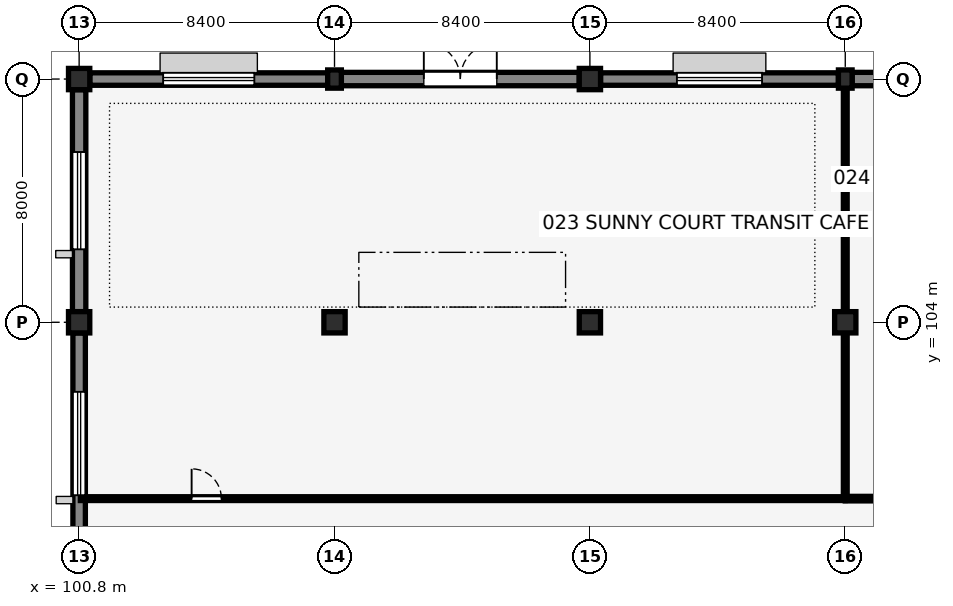
"""IFC4 building model, lengths in metres.
Left out: names, types, materials, properties, quantities, classifications, styles, units other than length and angle.
Written with IfcOpenShell. Run it as: python <this file> out.ifc"""

import sys

from ifc_helpers import new_model, si_unit, direction, frame, frame_2d, origin, origin_2d, place, context, subcontext, project, spatial, rectangle, extrude, element, fill, save


model = new_model("IFC4")
c1 = context("Model", 3, precision=1e-05, world=origin(), true_north=direction((0.0, 1.0)))
c2 = subcontext(c1, "Body", "Model", "MODEL_VIEW")
j1 = project(units=[si_unit("LENGTHUNIT", "METRE"), si_unit("PLANEANGLEUNIT", "RADIAN")], contexts=[c1])
p1 = place(None, origin())
s1 = spatial("IfcSite", under=j1, at=p1, CompositionType="ELEMENT")
p2 = place(p1, origin())
s2 = spatial("IfcBuilding", under=s1, at=p2, CompositionType="ELEMENT")
p3 = place(p2, origin())
s3 = spatial("IfcBuildingStorey", under=s2, at=p3, CompositionType="ELEMENT", Elevation=0.0)
for number, where, z_axis, x_axis in (
    (1, (100.8, 104.0, 0.0), (0.0, 0.0, 1.0), (1.0, 0.0, 0.0)),
    (2, (100.8, 112.0, 0.0), (0.0, 0.0, 1.0), (1.0, 0.0, 0.0)),
    (3, (109.2, 104.0, 0.0), (0.0, 0.0, 1.0), (1.0, 0.0, 0.0)),
):
    element("IfcColumn", number, at=place(p3, frame(where, z_axis=z_axis, x_axis=x_axis)), inside=s3, PredefinedType="COLUMN", context=c2, shape_type="SweptSolid", body=[
        extrude(rectangle(XDim=0.7, YDim=0.7, at=origin_2d()), origin(), (0.0, 0.0, 1.0), 5.15),
    ])
p4 = place(p3, frame((109.2, 112.0, 0.0), z_axis=(0.0, 0.0, 1.0), x_axis=(1.0, 0.0, 0.0)))
e4 = element("IfcColumn", 4, at=p4, inside=s3, PredefinedType="PILASTER", context=c2, shape_type="SweptSolid", body=[
    extrude(rectangle(XDim=0.45, YDim=0.6, at=origin_2d()), origin(), (0.0, 0.0, 1.0), 5.15),
])
for number, where, z_axis, x_axis in (
    (5, (117.6, 104.0, 0.0), (0.0, 0.0, 1.0), (1.0, 0.0, 0.0)),
    (6, (117.6, 112.0, 0.0), (0.0, 0.0, 1.0), (1.0, 0.0, 0.0)),
    (7, (126.0, 104.0, 0.0), (0.0, 0.0, 1.0), (1.0, 0.0, 0.0)),
):
    element("IfcColumn", number, at=place(p3, frame(where, z_axis=z_axis, x_axis=x_axis)), inside=s3, PredefinedType="COLUMN", context=c2, shape_type="SweptSolid", body=[
        extrude(rectangle(XDim=0.7, YDim=0.7, at=origin_2d()), origin(), (0.0, 0.0, 1.0), 5.15),
    ])
p5 = place(p3, frame((126.0, 112.0, 0.0), z_axis=(0.0, 0.0, 1.0), x_axis=(1.0, 0.0, 0.0)))
e8 = element("IfcColumn", 8, at=p5, inside=s3, PredefinedType="PILASTER", context=c2, shape_type="SweptSolid", body=[
    extrude(rectangle(XDim=0.45, YDim=0.6, at=origin_2d()), origin(), (0.0, 0.0, 1.0), 5.15),
])
p6 = place(p3, frame((100.8, 96.375, 0.0), z_axis=(0.0, 0.0, 1.0), x_axis=(0.0, 1.0, 0.0)))
e9 = element("IfcWall", 9, at=p6, inside=s3, PredefinedType="SOLIDWALL", context=c2, shape_type="SweptSolid", body=[
    extrude(rectangle(XDim=7.275, YDim=0.41, at=frame_2d((3.637, 0.0))), origin(), (0.0, 0.0, 1.0), 4.747),
])
p7 = place(p6, frame((1.938, 0.0, 0.9), z_axis=(0.0, 0.0, 1.0), x_axis=(1.0, 0.0, 0.0)))
e10 = element("IfcOpeningElement", 10, at=p7, cuts=e9, PredefinedType="OPENING", context=c2, shape_type="SweptSolid", body=[
    extrude(rectangle(XDim=3.4, YDim=1.7, at=frame_2d((1.7, 0.85))), frame((0.0, 0.215, 0.0), z_axis=(0.0, -1.0, 0.0), x_axis=(1.0, 0.0, 0.0)), (0.0, 0.0, 1.0), 0.43),
])
p8 = place(p3, frame((100.8, 104.35, 0.0), z_axis=(0.0, 0.0, 1.0), x_axis=(0.0, 1.0, 0.0)))
e11 = element("IfcWall", 11, at=p8, inside=s3, PredefinedType="SOLIDWALL", context=c2, shape_type="SweptSolid", body=[
    extrude(rectangle(XDim=7.3, YDim=0.44, at=frame_2d((3.65, 0.0))), origin(), (0.0, 0.0, 1.0), 4.747),
])
p9 = place(p8, frame((2.05, 0.0, 0.9), z_axis=(0.0, 0.0, 1.0), x_axis=(1.0, 0.0, 0.0)))
e12 = element("IfcOpeningElement", 12, at=p9, cuts=e11, PredefinedType="OPENING", context=c2, shape_type="SweptSolid", body=[
    extrude(rectangle(XDim=3.2, YDim=1.65, at=frame_2d((1.6, 0.825))), frame((0.0, 0.23, 0.0), z_axis=(0.0, -1.0, 0.0), x_axis=(1.0, 0.0, 0.0)), (0.0, 0.0, 1.0), 0.46),
])
p10 = place(p3, frame((101.15, 112.0, 0.0), z_axis=(0.0, 0.0, 1.0), x_axis=(1.0, 0.0, 0.0)))
e13 = element("IfcWall", 13, at=p10, inside=s3, PredefinedType="SOLIDWALL", context=c2, shape_type="SweptSolid", body=[
    extrude(rectangle(XDim=7.825, YDim=0.41, at=frame_2d((3.913, 0.0))), origin(), (0.0, 0.0, 1.0), 4.74),
])
p11 = place(p10, frame((2.413, 0.0, 0.9), z_axis=(0.0, 0.0, 1.0), x_axis=(1.0, 0.0, 0.0)))
e14 = element("IfcOpeningElement", 14, at=p11, cuts=e13, PredefinedType="OPENING", context=c2, shape_type="SweptSolid", body=[
    extrude(rectangle(XDim=3.0, YDim=1.65, at=frame_2d((1.5, 0.825))), frame((0.0, 0.215, 0.0), z_axis=(0.0, -1.0, 0.0), x_axis=(1.0, 0.0, 0.0)), (0.0, 0.0, 1.0), 0.43),
])
p12 = place(p3, frame((109.425, 112.0, 0.0), z_axis=(0.0, 0.0, 1.0), x_axis=(1.0, 0.0, 0.0)))
e15 = element("IfcWall", 15, at=p12, inside=s3, PredefinedType="SOLIDWALL", context=c2, shape_type="SweptSolid", body=[
    extrude(rectangle(XDim=7.825, YDim=0.44, at=frame_2d((3.913, 0.0))), origin(), (0.0, 0.0, 1.0), 4.74),
])
p13 = place(p12, frame((2.712, 0.0, 0.0), z_axis=(0.0, 0.0, 1.0), x_axis=(1.0, 0.0, 0.0)))
e16 = element("IfcOpeningElement", 16, at=p13, cuts=e15, PredefinedType="OPENING", context=c2, shape_type="SweptSolid", body=[
    extrude(rectangle(XDim=2.4, YDim=2.6, at=frame_2d((1.2, 1.3))), frame((0.0, 0.23, 0.0), z_axis=(0.0, -1.0, 0.0), x_axis=(1.0, 0.0, 0.0)), (0.0, 0.0, 1.0), 0.46),
])
p14 = place(p3, frame((117.95, 112.0, 0.0), z_axis=(0.0, 0.0, 1.0), x_axis=(1.0, 0.0, 0.0)))
e17 = element("IfcWall", 17, at=p14, inside=s3, PredefinedType="SOLIDWALL", context=c2, shape_type="SweptSolid", body=[
    extrude(rectangle(XDim=7.825, YDim=0.41, at=frame_2d((3.913, 0.0))), origin(), (0.0, 0.0, 1.0), 4.74),
])
p15 = place(p14, frame((2.512, 0.0, 0.9), z_axis=(0.0, 0.0, 1.0), x_axis=(1.0, 0.0, 0.0)))
e18 = element("IfcOpeningElement", 18, at=p15, cuts=e17, PredefinedType="OPENING", context=c2, shape_type="SweptSolid", body=[
    extrude(rectangle(XDim=2.8, YDim=1.6, at=frame_2d((1.4, 0.8))), frame((0.0, 0.215, 0.0), z_axis=(0.0, -1.0, 0.0), x_axis=(1.0, 0.0, 0.0)), (0.0, 0.0, 1.0), 0.43),
])
p16 = place(p3, frame((126.225, 112.0, 0.0), z_axis=(0.0, 0.0, 1.0), x_axis=(1.0, 0.0, 0.0)))
e19 = element("IfcWall", 19, at=p16, inside=s3, PredefinedType="SOLIDWALL", context=c2, shape_type="SweptSolid", body=[
    extrude(rectangle(XDim=7.825, YDim=0.44, at=frame_2d((3.913, 0.0))), origin(), (0.0, 0.0, 1.0), 4.74),
])
p17 = place(p16, frame((2.613, 0.0, 0.9), z_axis=(0.0, 0.0, 1.0), x_axis=(1.0, 0.0, 0.0)))
e20 = element("IfcOpeningElement", 20, at=p17, cuts=e19, PredefinedType="OPENING", context=c2, shape_type="SweptSolid", body=[
    extrude(rectangle(XDim=2.6, YDim=1.8, at=frame_2d((1.3, 0.9))), frame((0.0, 0.23, 0.0), z_axis=(0.0, -1.0, 0.0), x_axis=(1.0, 0.0, 0.0)), (0.0, 0.0, 1.0), 0.46),
])
p18 = place(p3, frame((100.84, 98.2, 0.0), z_axis=(0.0, 0.0, 1.0), x_axis=(1.0, 0.0, 0.0)))
e21 = element("IfcWall", 21, at=p18, inside=s3, PredefinedType="PARTITIONING", context=c2, shape_type="SweptSolid", body=[
    extrude(rectangle(XDim=25.16, YDim=0.125, at=frame_2d((12.58, 0.0))), origin(), (0.0, 0.0, 1.0), 5.15),
])
p19 = place(p18, frame((3.66, 0.0, 0.0), z_axis=(0.0, 0.0, 1.0), x_axis=(1.0, 0.0, 0.0)))
e22 = element("IfcOpeningElement", 22, at=p19, cuts=e21, PredefinedType="OPENING", context=c2, shape_type="SweptSolid", body=[
    extrude(rectangle(XDim=0.98, YDim=2.15, at=frame_2d((0.49, 1.075))), frame((0.0, 0.073, 0.0), z_axis=(0.0, -1.0, 0.0), x_axis=(1.0, 0.0, 0.0)), (0.0, 0.0, 1.0), 0.145),
])
p20 = place(p3, frame((126.0, 98.2, 0.0), z_axis=(0.0, 0.0, 1.0), x_axis=(1.0, 0.0, 0.0)))
e23 = element("IfcWall", 23, at=p20, inside=s3, PredefinedType="PARTITIONING", context=c2, shape_type="SweptSolid", body=[
    extrude(rectangle(XDim=8.4, YDim=0.15, at=frame_2d((4.2, 0.0))), origin(), (0.0, 0.0, 1.0), 5.15),
])
p21 = place(p20, frame((3.7, 0.0, 0.0), z_axis=(0.0, 0.0, 1.0), x_axis=(1.0, 0.0, 0.0)))
e24 = element("IfcOpeningElement", 24, at=p21, cuts=e23, PredefinedType="OPENING", context=c2, shape_type="SweptSolid", body=[
    extrude(rectangle(XDim=1.08, YDim=2.18, at=frame_2d((0.54, 1.09))), frame((0.0, 0.085, 0.0), z_axis=(0.0, -1.0, 0.0), x_axis=(1.0, 0.0, 0.0)), (0.0, 0.0, 1.0), 0.17),
])
p22 = place(p3, frame((126.0, 98.2, 0.0), z_axis=(0.0, 0.0, 1.0), x_axis=(0.0, 1.0, 0.0)))
e25 = element("IfcWall", 25, at=p22, inside=s3, PredefinedType="PARTITIONING", context=c2, shape_type="SweptSolid", body=[
    extrude(rectangle(XDim=5.46, YDim=0.125, at=frame_2d((2.73, 0.0))), origin(), (0.0, 0.0, 1.0), 4.542),
])
p23 = place(p3, frame((126.0, 104.34, 0.0), z_axis=(0.0, 0.0, 1.0), x_axis=(0.0, 1.0, 0.0)))
e26 = element("IfcWall", 26, at=p23, inside=s3, PredefinedType="PARTITIONING", context=c2, shape_type="SweptSolid", body=[
    extrude(rectangle(XDim=7.37, YDim=0.125, at=frame_2d((3.685, 0.0))), origin(), (0.0, 0.0, 1.0), 4.542),
])
p24 = place(p7, origin())
e27 = element("IfcWindow", 27, at=p24, inside=s3, PartitioningType="TRIPLE_PANEL_VERTICAL", PredefinedType="WINDOW", context=c2, shape_type="SweptSolid", body=[
    extrude(rectangle(XDim=3.4, YDim=1.7, at=frame_2d((1.7, 0.85))), frame((0.0, 0.03, 0.0), z_axis=(0.0, -1.0, 0.0), x_axis=(1.0, 0.0, 0.0)), (0.0, 0.0, 1.0), 0.06),
])
fill(e10, e27)
p25 = place(p9, origin())
e28 = element("IfcWindow", 28, at=p25, inside=s3, PartitioningType="TRIPLE_PANEL_VERTICAL", PredefinedType="WINDOW", context=c2, shape_type="SweptSolid", body=[
    extrude(rectangle(XDim=3.2, YDim=1.65, at=frame_2d((1.6, 0.825))), frame((0.0, 0.03, 0.0), z_axis=(0.0, -1.0, 0.0), x_axis=(1.0, 0.0, 0.0)), (0.0, 0.0, 1.0), 0.06),
])
fill(e12, e28)
p26 = place(p11, origin())
e29 = element("IfcWindow", 29, at=p26, inside=s3, PartitioningType="DOUBLE_PANEL_VERTICAL", PredefinedType="WINDOW", context=c2, shape_type="SweptSolid", body=[
    extrude(rectangle(XDim=3.0, YDim=1.65, at=frame_2d((1.5, 0.825))), frame((0.0, 0.03, 0.0), z_axis=(0.0, -1.0, 0.0), x_axis=(1.0, 0.0, 0.0)), (0.0, 0.0, 1.0), 0.06),
])
fill(e14, e29)
p27 = place(p13, origin())
e30 = element("IfcDoor", 30, at=p27, inside=s3, OperationType="DOUBLE_DOOR_SINGLE_SWING", PredefinedType="DOOR", context=c2, shape_type="SweptSolid", body=[
    extrude(rectangle(XDim=2.4, YDim=2.6, at=frame_2d((1.2, 1.3))), frame((0.0, 0.025, 0.0), z_axis=(0.0, -1.0, 0.0), x_axis=(1.0, 0.0, 0.0)), (0.0, 0.0, 1.0), 0.05),
])
fill(e16, e30)
p28 = place(p15, origin())
e31 = element("IfcWindow", 31, at=p28, inside=s3, PartitioningType="DOUBLE_PANEL_VERTICAL", PredefinedType="WINDOW", context=c2, shape_type="SweptSolid", body=[
    extrude(rectangle(XDim=2.8, YDim=1.6, at=frame_2d((1.4, 0.8))), frame((0.0, 0.03, 0.0), z_axis=(0.0, -1.0, 0.0), x_axis=(1.0, 0.0, 0.0)), (0.0, 0.0, 1.0), 0.06),
])
fill(e18, e31)
p29 = place(p19, origin())
e32 = element("IfcDoor", 32, at=p29, inside=s3, OperationType="SINGLE_SWING_LEFT", PredefinedType="DOOR", context=c2, shape_type="SweptSolid", body=[
    extrude(rectangle(XDim=0.98, YDim=2.15, at=frame_2d((0.49, 1.075))), frame((0.0, 0.025, 0.0), z_axis=(0.0, -1.0, 0.0), x_axis=(1.0, 0.0, 0.0)), (0.0, 0.0, 1.0), 0.05),
])
fill(e22, e32)
save(model, sys.argv[1])
